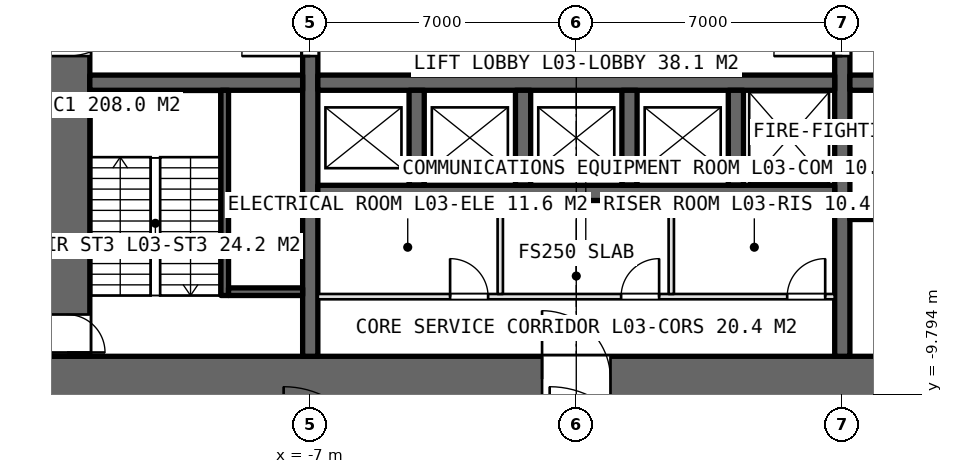
"""IFC4 building model, lengths in metres.
Left out: names, types, materials, properties, quantities, classifications, styles, units other than length and angle.
Written with IfcOpenShell. Run it as: python <this file> out.ifc"""

import sys

from ifc_helpers import new_model, si_unit, direction, frame, frame_2d, origin, place, context, subcontext, project, spatial, rectangle, extrude, element, fill, save


model = new_model("IFC4")
c1 = context("Model", 3, precision=1e-05, world=origin(), true_north=direction((0.0, 1.0)))
c2 = subcontext(c1, "Body", "Model", "MODEL_VIEW")
j1 = project(units=[si_unit("LENGTHUNIT", "METRE"), si_unit("PLANEANGLEUNIT", "RADIAN")], contexts=[c1])
p1 = place(None, origin())
s1 = spatial("IfcSite", under=j1, at=p1, CompositionType="ELEMENT")
p2 = place(p1, origin())
s2 = spatial("IfcBuilding", under=s1, at=p2, CompositionType="ELEMENT")
p3 = place(p2, frame((0.0, 0.0, 15.0)))
s3 = spatial("IfcBuildingStorey", under=s2, at=p3, CompositionType="ELEMENT", Elevation=15.0)
p4 = place(p3, frame((-14.0, -9.4, 0.0), z_axis=(0.0, 0.0, 1.0), x_axis=(1.0, 0.0, 0.0)))
e1 = element("IfcWall", 1, at=p4, inside=s3, PredefinedType="SHEAR", context=c2, shape_type="SweptSolid", body=[
    extrude(rectangle(XDim=28.0, YDim=1.2, at=frame_2d((14.0, 0.0))), origin(), (0.0, 0.0, 1.0), 5.0),
])
p5 = place(p4, frame((13.1, 0.0, 0.0)))
e2 = element("IfcOpeningElement", 2, at=p5, cuts=e1, PredefinedType="OPENING", context=c2, shape_type="SweptSolid", body=[
    extrude(rectangle(XDim=1.8, YDim=2.4, at=frame_2d((0.9, 1.2))), frame((0.0, 0.61, 0.0), z_axis=(0.0, -1.0, 0.0), x_axis=(1.0, 0.0, 0.0)), (0.0, 0.0, 1.0), 1.22),
])
p6 = place(p4, frame((22.9, 0.0, 0.0)))
e3 = element("IfcOpeningElement", 3, at=p6, cuts=e1, PredefinedType="OPENING", context=c2, shape_type="SweptSolid", body=[
    extrude(rectangle(XDim=2.2, YDim=2.7, at=frame_2d((1.1, 1.35))), frame((0.0, 0.61, 0.0), z_axis=(0.0, -1.0, 0.0), x_axis=(1.0, 0.0, 0.0)), (0.0, 0.0, 1.0), 1.22),
])
p7 = place(p3, frame((-13.4, 8.8, 0.0), z_axis=(0.0, 0.0, 1.0), x_axis=(0.0, -1.0, 0.0)))
e4 = element("IfcWall", 4, at=p7, inside=s3, PredefinedType="SHEAR", context=c2, shape_type="SweptSolid", body=[
    extrude(rectangle(XDim=17.6, YDim=1.2, at=frame_2d((8.8, 0.0))), origin(), (0.0, 0.0, 1.0), 5.0),
])
p8 = place(p7, frame((7.9, 0.0, 0.0)))
e5 = element("IfcOpeningElement", 5, at=p8, cuts=e4, PredefinedType="OPENING", context=c2, shape_type="SweptSolid", body=[
    extrude(rectangle(XDim=1.8, YDim=2.4, at=frame_2d((0.9, 1.2))), frame((0.0, 0.61, 0.0), z_axis=(0.0, -1.0, 0.0), x_axis=(1.0, 0.0, 0.0)), (0.0, 0.0, 1.0), 1.22),
])
p9 = place(p7, frame((16.5, 0.0, 0.0)))
e6 = element("IfcOpeningElement", 6, at=p9, cuts=e4, PredefinedType="OPENING", context=c2, shape_type="SweptSolid", body=[
    extrude(rectangle(XDim=1.0, YDim=2.4, at=frame_2d((0.5, 1.2))), frame((0.0, 0.61, 0.0), z_axis=(0.0, -1.0, 0.0), x_axis=(1.0, 0.0, 0.0)), (0.0, 0.0, 1.0), 1.22),
])
p10 = place(p3, frame((-7.0, -8.8, 0.0), z_axis=(0.0, 0.0, 1.0), x_axis=(0.0, 1.0, 0.0)))
e7 = element("IfcWall", 7, at=p10, inside=s3, PredefinedType="SHEAR", context=c2, shape_type="SweptSolid", body=[
    extrude(rectangle(XDim=17.6, YDim=0.4, at=frame_2d((8.8, 0.0))), origin(), (0.0, 0.0, 1.0), 5.0),
])
p11 = place(p10, frame((7.9, 0.0, 0.0)))
e8 = element("IfcOpeningElement", 8, at=p11, cuts=e7, PredefinedType="OPENING", context=c2, shape_type="SweptSolid", body=[
    extrude(rectangle(XDim=1.8, YDim=2.4, at=frame_2d((0.9, 1.2))), frame((0.0, 0.21, 0.0), z_axis=(0.0, -1.0, 0.0), x_axis=(1.0, 0.0, 0.0)), (0.0, 0.0, 1.0), 0.42),
])
p12 = place(p3, frame((7.0, -8.8, 0.0), z_axis=(0.0, 0.0, 1.0), x_axis=(0.0, 1.0, 0.0)))
e9 = element("IfcWall", 9, at=p12, inside=s3, PredefinedType="SHEAR", context=c2, shape_type="SweptSolid", body=[
    extrude(rectangle(XDim=17.6, YDim=0.4, at=frame_2d((8.8, 0.0))), origin(), (0.0, 0.0, 1.0), 5.0),
])
p13 = place(p12, frame((7.9, 0.0, 0.0)))
e10 = element("IfcOpeningElement", 10, at=p13, cuts=e9, PredefinedType="OPENING", context=c2, shape_type="SweptSolid", body=[
    extrude(rectangle(XDim=1.8, YDim=2.4, at=frame_2d((0.9, 1.2))), frame((0.0, 0.21, 0.0), z_axis=(0.0, -1.0, 0.0), x_axis=(1.0, 0.0, 0.0)), (0.0, 0.0, 1.0), 0.42),
])
for number, where, z_axis, x_axis in (
    (11, (-6.8, -1.6, 0.0), (0.0, 0.0, 1.0), (1.0, 0.0, 0.0)),
    (12, (-6.8, -4.5, 0.0), (0.0, 0.0, 1.0), (1.0, 0.0, 0.0)),
):
    element("IfcWall", number, at=place(p3, frame(where, z_axis=z_axis, x_axis=x_axis)), inside=s3, PredefinedType="SHEAR", context=c2, shape_type="SweptSolid", body=[
        extrude(rectangle(XDim=13.6, YDim=0.4, at=frame_2d((6.8, 0.0))), origin(), (0.0, 0.0, 1.0), 5.0),
    ])
p14 = place(p3, frame((-12.8, -1.6, 0.0), z_axis=(0.0, 0.0, 1.0), x_axis=(1.0, 0.0, 0.0)))
e13 = element("IfcWall", 13, at=p14, inside=s3, PredefinedType="SHEAR", context=c2, shape_type="SweptSolid", body=[
    extrude(rectangle(XDim=5.6, YDim=0.4, at=frame_2d((2.8, 0.0))), origin(), (0.0, 0.0, 1.0), 5.0),
])
p15 = place(p3, frame((7.2, -1.6, 0.0), z_axis=(0.0, 0.0, 1.0), x_axis=(1.0, 0.0, 0.0)))
e14 = element("IfcWall", 14, at=p15, inside=s3, PredefinedType="SHEAR", context=c2, shape_type="SweptSolid", body=[
    extrude(rectangle(XDim=5.6, YDim=0.4, at=frame_2d((2.8, 0.0))), origin(), (0.0, 0.0, 1.0), 5.0),
])
p16 = place(p15, frame((0.9, 0.0, 0.0)))
e15 = element("IfcOpeningElement", 15, at=p16, cuts=e14, PredefinedType="OPENING", context=c2, shape_type="SweptSolid", body=[
    extrude(rectangle(XDim=1.3, YDim=2.4, at=frame_2d((0.65, 1.2))), frame((0.0, 0.21, 0.0), z_axis=(0.0, -1.0, 0.0), x_axis=(1.0, 0.0, 0.0)), (0.0, 0.0, 1.0), 0.42),
])
p17 = place(p15, frame((3.9, 0.0, 0.0)))
e16 = element("IfcOpeningElement", 16, at=p17, cuts=e14, PredefinedType="OPENING", context=c2, shape_type="SweptSolid", body=[
    extrude(rectangle(XDim=1.3, YDim=2.4, at=frame_2d((0.65, 1.2))), frame((0.0, 0.21, 0.0), z_axis=(0.0, -1.0, 0.0), x_axis=(1.0, 0.0, 0.0)), (0.0, 0.0, 1.0), 0.42),
])
p18 = place(p3, frame((7.2, -5.0, 0.0), z_axis=(0.0, 0.0, 1.0), x_axis=(1.0, 0.0, 0.0)))
e17 = element("IfcWall", 17, at=p18, inside=s3, PredefinedType="SHEAR", context=c2, shape_type="SweptSolid", body=[
    extrude(rectangle(XDim=5.6, YDim=0.4, at=frame_2d((2.8, 0.0))), origin(), (0.0, 0.0, 1.0), 5.0),
])
for number, where, z_axis, x_axis in (
    (18, (-4.2, -4.3, 0.0), (0.0, 0.0, 1.0), (0.0, 1.0, 0.0)),
    (19, (-1.4, -4.3, 0.0), (0.0, 0.0, 1.0), (0.0, 1.0, 0.0)),
    (20, (1.4, -4.3, 0.0), (0.0, 0.0, 1.0), (0.0, 1.0, 0.0)),
    (21, (4.2, -4.3, 0.0), (0.0, 0.0, 1.0), (0.0, 1.0, 0.0)),
):
    element("IfcWall", number, at=place(p3, frame(where, z_axis=z_axis, x_axis=x_axis)), inside=s3, PredefinedType="SHEAR", context=c2, shape_type="SweptSolid", body=[
        extrude(rectangle(XDim=2.5, YDim=0.4, at=frame_2d((1.25, 0.0))), origin(), (0.0, 0.0, 1.0), 5.0),
    ])
p19 = place(p3, frame((-6.8, -7.23, 0.0), z_axis=(0.0, 0.0, 1.0), x_axis=(1.0, 0.0, 0.0)))
e22 = element("IfcWall", 22, at=p19, inside=s3, PredefinedType="PARTITIONING", context=c2, shape_type="SweptSolid", body=[
    extrude(rectangle(XDim=13.6, YDim=0.14, at=frame_2d((6.8, 0.0))), origin(), (0.0, 0.0, 1.0), 4.75),
])
p20 = place(p19, frame((3.48, 0.0, 0.0)))
e23 = element("IfcOpeningElement", 23, at=p20, cuts=e22, PredefinedType="OPENING", context=c2, shape_type="SweptSolid", body=[
    extrude(rectangle(XDim=1.0, YDim=2.4, at=frame_2d((0.5, 1.2))), frame((0.0, 0.08, 0.0), z_axis=(0.0, -1.0, 0.0), x_axis=(1.0, 0.0, 0.0)), (0.0, 0.0, 1.0), 0.16),
])
p21 = place(p19, frame((7.98, 0.0, 0.0)))
e24 = element("IfcOpeningElement", 24, at=p21, cuts=e22, PredefinedType="OPENING", context=c2, shape_type="SweptSolid", body=[
    extrude(rectangle(XDim=1.0, YDim=2.4, at=frame_2d((0.5, 1.2))), frame((0.0, 0.08, 0.0), z_axis=(0.0, -1.0, 0.0), x_axis=(1.0, 0.0, 0.0)), (0.0, 0.0, 1.0), 0.16),
])
p22 = place(p19, frame((12.35, 0.0, 0.0)))
e25 = element("IfcOpeningElement", 25, at=p22, cuts=e22, PredefinedType="OPENING", context=c2, shape_type="SweptSolid", body=[
    extrude(rectangle(XDim=1.0, YDim=2.4, at=frame_2d((0.5, 1.2))), frame((0.0, 0.08, 0.0), z_axis=(0.0, -1.0, 0.0), x_axis=(1.0, 0.0, 0.0)), (0.0, 0.0, 1.0), 0.16),
])
for number, where, z_axis, x_axis in (
    (26, (-2.0, -4.7, 0.0), (0.0, 0.0, 1.0), (0.0, -1.0, 0.0)),
    (27, (2.5, -4.7, 0.0), (0.0, 0.0, 1.0), (0.0, -1.0, 0.0)),
):
    element("IfcWall", number, at=place(p3, frame(where, z_axis=z_axis, x_axis=x_axis)), inside=s3, PredefinedType="PARTITIONING", context=c2, shape_type="SweptSolid", body=[
        extrude(rectangle(XDim=2.46, YDim=0.14, at=frame_2d((1.23, 0.0))), origin(), (0.0, 0.0, 1.0), 4.75),
    ])
p23 = place(p3, frame((-9.25, -7.2, 0.0), z_axis=(0.0, 0.0, 1.0), x_axis=(0.0, 1.0, 0.0)))
e28 = element("IfcWall", 28, at=p23, inside=s3, PredefinedType="SOLIDWALL", context=c2, shape_type="SweptSolid", body=[
    extrude(rectangle(XDim=5.4, YDim=0.2, at=frame_2d((2.7, 0.0))), origin(), (0.0, 0.0, 1.0), 5.0),
])
p24 = place(p3, frame((-9.15, -7.1, 0.0), z_axis=(0.0, 0.0, 1.0), x_axis=(1.0, 0.0, 0.0)))
e29 = element("IfcWall", 29, at=p24, inside=s3, PredefinedType="SOLIDWALL", context=c2, shape_type="SweptSolid", body=[
    extrude(rectangle(XDim=1.95, YDim=0.2, at=frame_2d((0.975, 0.0))), origin(), (0.0, 0.0, 1.0), 5.0),
])
p25 = place(p8, origin())
e30 = element("IfcDoor", 30, at=p25, inside=s3, OperationType="DOUBLE_DOOR_SINGLE_SWING", PredefinedType="DOOR", context=c2, shape_type="SweptSolid", body=[
    extrude(rectangle(XDim=1.8, YDim=2.4, at=frame_2d((0.9, 1.2))), frame((0.0, 0.025, 0.0), z_axis=(0.0, -1.0, 0.0), x_axis=(1.0, 0.0, 0.0)), (0.0, 0.0, 1.0), 0.05),
])
fill(e5, e30)
p26 = place(p11, origin())
e31 = element("IfcDoor", 31, at=p26, inside=s3, OperationType="DOUBLE_DOOR_SINGLE_SWING", PredefinedType="DOOR", context=c2, shape_type="SweptSolid", body=[
    extrude(rectangle(XDim=1.8, YDim=2.4, at=frame_2d((0.9, 1.2))), frame((0.0, 0.025, 0.0), z_axis=(0.0, -1.0, 0.0), x_axis=(1.0, 0.0, 0.0)), (0.0, 0.0, 1.0), 0.05),
])
fill(e8, e31)
p27 = place(p13, origin())
e32 = element("IfcDoor", 32, at=p27, inside=s3, OperationType="DOUBLE_DOOR_SINGLE_SWING", PredefinedType="DOOR", context=c2, shape_type="SweptSolid", body=[
    extrude(rectangle(XDim=1.8, YDim=2.4, at=frame_2d((0.9, 1.2))), frame((0.0, 0.025, 0.0), z_axis=(0.0, -1.0, 0.0), x_axis=(1.0, 0.0, 0.0)), (0.0, 0.0, 1.0), 0.05),
])
fill(e10, e32)
p28 = place(p9, origin())
e33 = element("IfcDoor", 33, at=p28, inside=s3, OperationType="SINGLE_SWING_RIGHT", PredefinedType="DOOR", context=c2, shape_type="SweptSolid", body=[
    extrude(rectangle(XDim=1.0, YDim=2.4, at=frame_2d((0.5, 1.2))), frame((0.0, 0.025, 0.0), z_axis=(0.0, -1.0, 0.0), x_axis=(1.0, 0.0, 0.0)), (0.0, 0.0, 1.0), 0.05),
])
fill(e6, e33)
p29 = place(p20, origin())
e34 = element("IfcDoor", 34, at=p29, inside=s3, OperationType="SINGLE_SWING_LEFT", PredefinedType="DOOR", context=c2, shape_type="SweptSolid", body=[
    extrude(rectangle(XDim=1.0, YDim=2.4, at=frame_2d((0.5, 1.2))), frame((0.0, 0.025, 0.0), z_axis=(0.0, -1.0, 0.0), x_axis=(1.0, 0.0, 0.0)), (0.0, 0.0, 1.0), 0.05),
])
fill(e23, e34)
p30 = place(p21, origin())
e35 = element("IfcDoor", 35, at=p30, inside=s3, OperationType="SINGLE_SWING_RIGHT", PredefinedType="DOOR", context=c2, shape_type="SweptSolid", body=[
    extrude(rectangle(XDim=1.0, YDim=2.4, at=frame_2d((0.5, 1.2))), frame((0.0, 0.025, 0.0), z_axis=(0.0, -1.0, 0.0), x_axis=(1.0, 0.0, 0.0)), (0.0, 0.0, 1.0), 0.05),
])
fill(e24, e35)
p31 = place(p22, origin())
e36 = element("IfcDoor", 36, at=p31, inside=s3, OperationType="SINGLE_SWING_RIGHT", PredefinedType="DOOR", context=c2, shape_type="SweptSolid", body=[
    extrude(rectangle(XDim=1.0, YDim=2.4, at=frame_2d((0.5, 1.2))), frame((0.0, 0.025, 0.0), z_axis=(0.0, -1.0, 0.0), x_axis=(1.0, 0.0, 0.0)), (0.0, 0.0, 1.0), 0.05),
])
fill(e25, e36)
p32 = place(p5, origin())
e37 = element("IfcDoor", 37, at=p32, inside=s3, OperationType="DOUBLE_DOOR_SINGLE_SWING", PredefinedType="DOOR", context=c2, shape_type="SweptSolid", body=[
    extrude(rectangle(XDim=1.8, YDim=2.4, at=frame_2d((0.9, 1.2))), frame((0.0, 0.025, 0.0), z_axis=(0.0, -1.0, 0.0), x_axis=(1.0, 0.0, 0.0)), (0.0, 0.0, 1.0), 0.05),
])
fill(e2, e37)
save(model, sys.argv[1])
